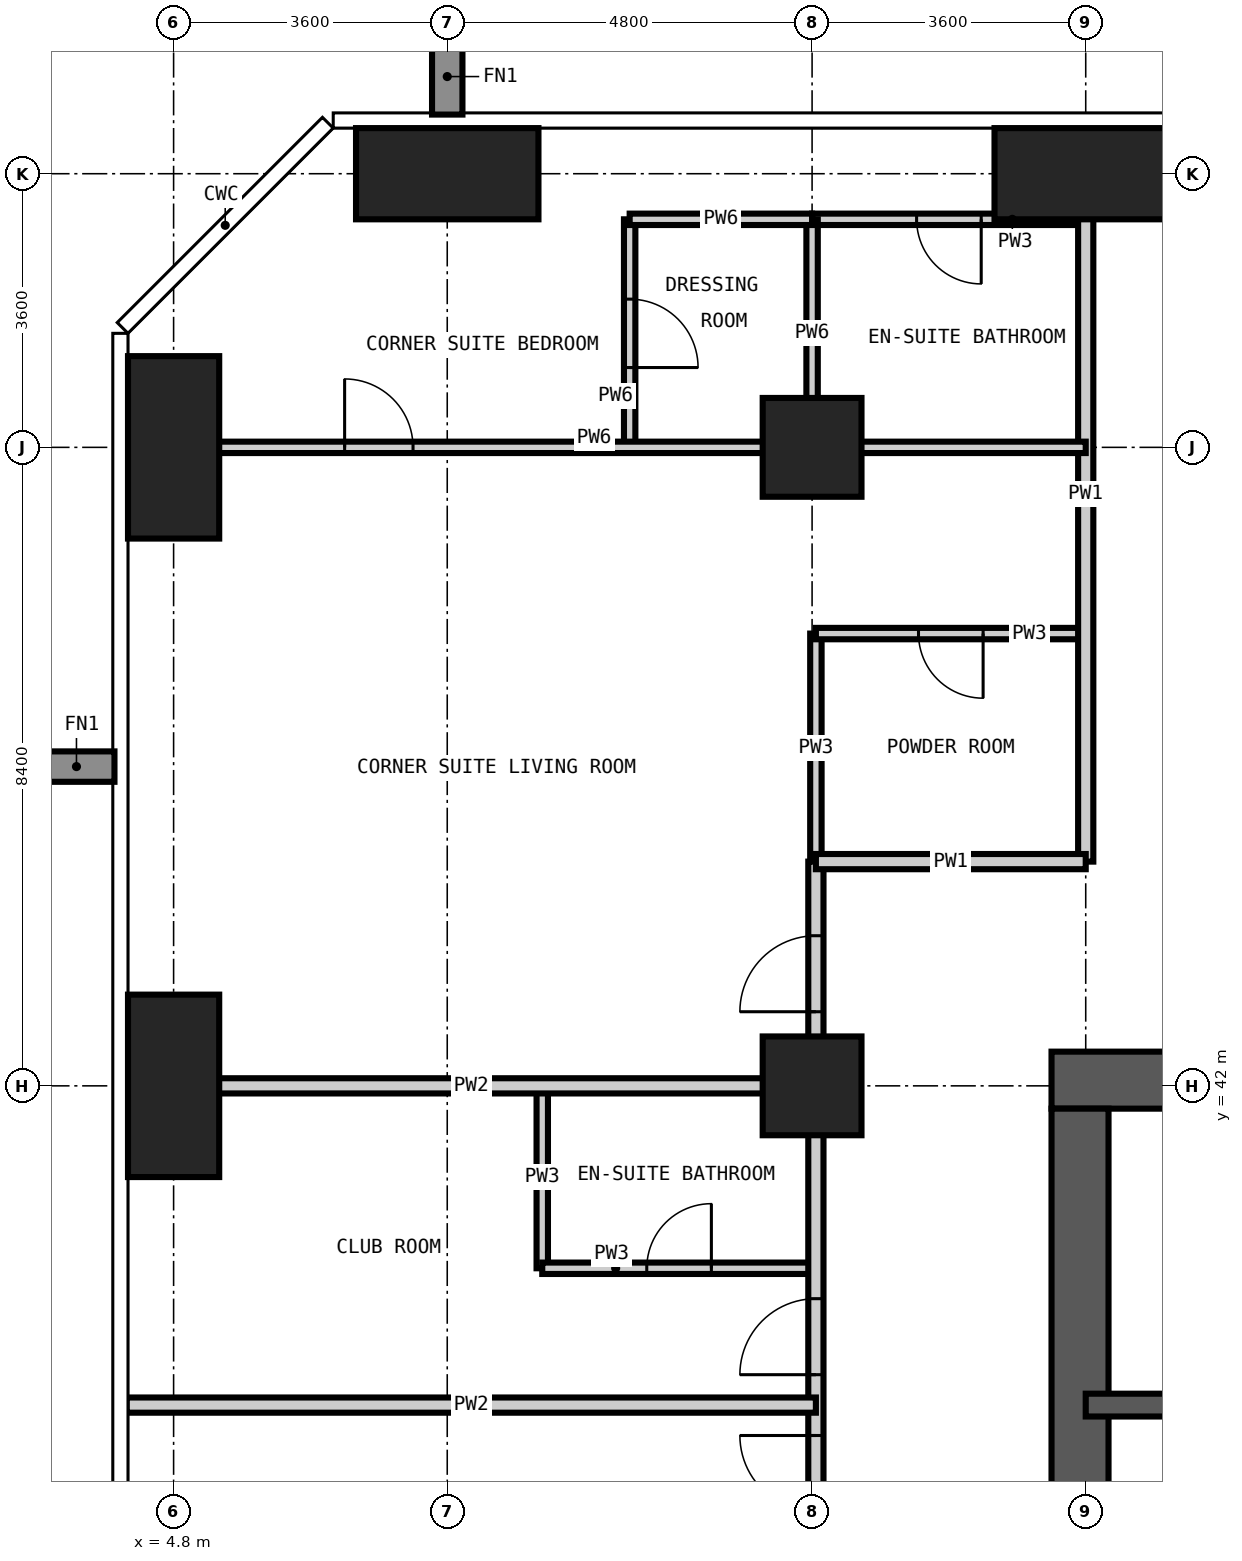
"""IFC4 building model, lengths in metres.
Left out: names, types, materials, properties, quantities, classifications, styles, units other than length and angle.
Written with IfcOpenShell. Run it as: python <this file> out.ifc"""

import sys

from ifc_helpers import new_model, si_unit, direction, frame, frame_2d, origin, origin_2d, place, context, subcontext, project, spatial, rectangle, extrude, element, fill, save


model = new_model("IFC4")
c1 = context("Model", 3, precision=1e-05, world=origin(), true_north=direction((0.0, 1.0)))
c2 = subcontext(c1, "Body", "Model", "MODEL_VIEW")
j1 = project(units=[si_unit("LENGTHUNIT", "METRE"), si_unit("PLANEANGLEUNIT", "RADIAN")], contexts=[c1])
p1 = place(None, origin())
s1 = spatial("IfcSite", under=j1, at=p1, CompositionType="ELEMENT")
p2 = place(p1, origin())
s2 = spatial("IfcBuilding", under=s1, at=p2, CompositionType="ELEMENT")
p3 = place(p2, frame((0.0, 0.0, 166.2)))
s3 = spatial("IfcBuildingStorey", under=s2, at=p3, CompositionType="ELEMENT", Elevation=166.2)
for number, where, z_axis, x_axis in (
    (1, (4.8, 42.0, -0.35), (0.0, 0.0, 1.0), (1.0, 0.0, 0.0)),
    (2, (4.8, 50.4, -0.35), (0.0, 0.0, 1.0), (1.0, 0.0, 0.0)),
):
    element("IfcColumn", number, at=place(p3, frame(where, z_axis=z_axis, x_axis=x_axis)), inside=s3, PredefinedType="COLUMN", context=c2, shape_type="SweptSolid", body=[
        extrude(rectangle(XDim=1.2, YDim=2.4, at=origin_2d()), origin(), (0.0, 0.0, 1.0), 3.6),
    ])
p4 = place(p3, frame((8.4, 54.0, -0.35), z_axis=(0.0, 0.0, 1.0), x_axis=(1.0, 0.0, 0.0)))
e3 = element("IfcColumn", 3, at=p4, inside=s3, PredefinedType="COLUMN", context=c2, shape_type="SweptSolid", body=[
    extrude(rectangle(XDim=2.4, YDim=1.2, at=origin_2d()), origin(), (0.0, 0.0, 1.0), 3.6),
])
for number, where, z_axis, x_axis in (
    (4, (13.2, 42.0, -0.35), (0.0, 0.0, 1.0), (1.0, 0.0, 0.0)),
    (5, (13.2, 50.4, -0.35), (0.0, 0.0, 1.0), (1.0, 0.0, 0.0)),
):
    element("IfcColumn", number, at=place(p3, frame(where, z_axis=z_axis, x_axis=x_axis)), inside=s3, PredefinedType="COLUMN", context=c2, shape_type="SweptSolid", body=[
        extrude(rectangle(XDim=1.3, YDim=1.3, at=origin_2d()), origin(), (0.0, 0.0, 1.0), 3.6),
    ])
p5 = place(p3, frame((16.8, 54.0, -0.35), z_axis=(0.0, 0.0, 1.0), x_axis=(1.0, 0.0, 0.0)))
e6 = element("IfcColumn", 6, at=p5, inside=s3, PredefinedType="COLUMN", context=c2, shape_type="SweptSolid", body=[
    extrude(rectangle(XDim=2.4, YDim=1.2, at=origin_2d()), origin(), (0.0, 0.0, 1.0), 3.6),
])
p6 = place(p3, frame((42.45, 42.075, -0.35), z_axis=(0.0, 0.0, 1.0), x_axis=(-1.0, 0.0, 0.0)))
e7 = element("IfcWall", 7, at=p6, inside=s3, PredefinedType="SHEAR", context=c2, shape_type="SweptSolid", body=[
    extrude(rectangle(XDim=26.1, YDim=0.75, at=frame_2d((13.05, 0.0))), origin(), (0.0, 0.0, 1.0), 3.6),
])
p7 = place(p6, frame((20.95, 0.0, 0.35)))
e8 = element("IfcOpeningElement", 8, at=p7, cuts=e7, PredefinedType="OPENING", context=c2, shape_type="SweptSolid", body=[
    extrude(rectangle(XDim=1.0, YDim=2.1, at=frame_2d((0.5, 1.05))), frame((0.0, 0.385, 0.0), z_axis=(0.0, -1.0, 0.0), x_axis=(1.0, 0.0, 0.0)), (0.0, 0.0, 1.0), 0.77),
])
p8 = place(p6, frame((10.35, 0.0, 0.35)))
e9 = element("IfcOpeningElement", 9, at=p8, cuts=e7, PredefinedType="OPENING", context=c2, shape_type="SweptSolid", body=[
    extrude(rectangle(XDim=1.2, YDim=2.2, at=frame_2d((0.6, 1.1))), frame((0.0, 0.385, 0.0), z_axis=(0.0, -1.0, 0.0), x_axis=(1.0, 0.0, 0.0)), (0.0, 0.0, 1.0), 0.77),
])
p9 = place(p3, frame((16.725, 41.7, -0.35), z_axis=(0.0, 0.0, 1.0), x_axis=(0.0, -1.0, 0.0)))
e10 = element("IfcWall", 10, at=p9, inside=s3, PredefinedType="SHEAR", context=c2, shape_type="SweptSolid", body=[
    extrude(rectangle(XDim=24.6, YDim=0.75, at=frame_2d((12.3, 0.0))), origin(), (0.0, 0.0, 1.0), 3.6),
])
p10 = place(p9, frame((11.4, 0.0, 0.35)))
e11 = element("IfcOpeningElement", 11, at=p10, cuts=e10, PredefinedType="OPENING", context=c2, shape_type="SweptSolid", body=[
    extrude(rectangle(XDim=1.8, YDim=2.2, at=frame_2d((0.9, 1.1))), frame((0.0, 0.385, 0.0), z_axis=(0.0, -1.0, 0.0), x_axis=(1.0, 0.0, 0.0)), (0.0, 0.0, 1.0), 0.77),
])
p11 = place(p9, frame((20.2, 0.0, 0.35)))
e12 = element("IfcOpeningElement", 12, at=p11, cuts=e10, PredefinedType="OPENING", context=c2, shape_type="SweptSolid", body=[
    extrude(rectangle(XDim=1.0, YDim=2.1, at=frame_2d((0.5, 1.05))), frame((0.0, 0.385, 0.0), z_axis=(0.0, -1.0, 0.0), x_axis=(1.0, 0.0, 0.0)), (0.0, 0.0, 1.0), 0.77),
])
p12 = place(p9, frame((5.5, 0.0, 0.35)))
e13 = element("IfcOpeningElement", 13, at=p12, cuts=e10, PredefinedType="OPENING", context=c2, shape_type="SweptSolid", body=[
    extrude(rectangle(XDim=1.0, YDim=2.1, at=frame_2d((0.5, 1.05))), frame((0.0, 0.385, 0.0), z_axis=(0.0, -1.0, 0.0), x_axis=(1.0, 0.0, 0.0)), (0.0, 0.0, 1.0), 0.77),
])
p13 = place(p3, frame((16.8, 37.8, -0.35), z_axis=(0.0, 0.0, 1.0), x_axis=(1.0, 0.0, 0.0)))
e14 = element("IfcWall", 14, at=p13, inside=s3, PredefinedType="SHEAR", context=c2, shape_type="SweptSolid", body=[
    extrude(rectangle(XDim=8.4, YDim=0.3, at=frame_2d((4.2, 0.0))), origin(), (0.0, 0.0, 1.0), 3.6),
])
p14 = place(p3, frame((9.65, 39.6, 0.0), z_axis=(0.0, 0.0, 1.0), x_axis=(0.0, 1.0, 0.0)))
e15 = element("IfcWall", 15, at=p14, inside=s3, PredefinedType="PARTITIONING", context=c2, shape_type="SweptSolid", body=[
    extrude(rectangle(XDim=2.4, YDim=0.15, at=frame_2d((1.2, 0.0))), origin(), (0.0, 0.0, 1.0), 3.25),
])
p15 = place(p3, frame((13.25, 44.95, 0.0), z_axis=(0.0, 0.0, 1.0), x_axis=(0.0, 1.0, 0.0)))
e16 = element("IfcWall", 16, at=p15, inside=s3, PredefinedType="PARTITIONING", context=c2, shape_type="SweptSolid", body=[
    extrude(rectangle(XDim=3.0, YDim=0.15, at=frame_2d((1.5, 0.0))), origin(), (0.0, 0.0, 1.0), 3.25),
])
p16 = place(p3, frame((9.65, 39.6, 0.0), z_axis=(0.0, 0.0, 1.0), x_axis=(1.0, 0.0, 0.0)))
e17 = element("IfcWall", 17, at=p16, inside=s3, PredefinedType="PARTITIONING", context=c2, shape_type="SweptSolid", body=[
    extrude(rectangle(XDim=3.6, YDim=0.15, at=frame_2d((1.8, 0.0))), origin(), (0.0, 0.0, 1.0), 3.25),
])
p17 = place(p16, frame((1.375, 0.0, 0.0)))
e18 = element("IfcOpeningElement", 18, at=p17, cuts=e17, PredefinedType="OPENING", context=c2, shape_type="SweptSolid", body=[
    extrude(rectangle(XDim=0.85, YDim=2.1, at=frame_2d((0.425, 1.05))), frame((0.0, 0.085, 0.0), z_axis=(0.0, -1.0, 0.0), x_axis=(1.0, 0.0, 0.0)), (0.0, 0.0, 1.0), 0.17),
])
p18 = place(p3, frame((13.25, 47.95, 0.0), z_axis=(0.0, 0.0, 1.0), x_axis=(1.0, 0.0, 0.0)))
e19 = element("IfcWall", 19, at=p18, inside=s3, PredefinedType="PARTITIONING", context=c2, shape_type="SweptSolid", body=[
    extrude(rectangle(XDim=3.55, YDim=0.15, at=frame_2d((1.775, 0.0))), origin(), (0.0, 0.0, 1.0), 3.25),
])
p19 = place(p18, frame((1.35, 0.0, 0.0)))
e20 = element("IfcOpeningElement", 20, at=p19, cuts=e19, PredefinedType="OPENING", context=c2, shape_type="SweptSolid", body=[
    extrude(rectangle(XDim=0.85, YDim=2.1, at=frame_2d((0.425, 1.05))), frame((0.0, 0.085, 0.0), z_axis=(0.0, -1.0, 0.0), x_axis=(1.0, 0.0, 0.0)), (0.0, 0.0, 1.0), 0.17),
])
p20 = place(p3, frame((13.2, 53.4, 0.0), z_axis=(0.0, 0.0, 1.0), x_axis=(1.0, 0.0, 0.0)))
e21 = element("IfcWall", 21, at=p20, inside=s3, PredefinedType="PARTITIONING", context=c2, shape_type="SweptSolid", body=[
    extrude(rectangle(XDim=3.6, YDim=0.15, at=frame_2d((1.8, 0.0))), origin(), (0.0, 0.0, 1.0), 3.25),
])
p21 = place(p20, frame((1.375, 0.0, 0.0)))
e22 = element("IfcOpeningElement", 22, at=p21, cuts=e21, PredefinedType="OPENING", context=c2, shape_type="SweptSolid", body=[
    extrude(rectangle(XDim=0.85, YDim=2.1, at=frame_2d((0.425, 1.05))), frame((0.0, 0.085, 0.0), z_axis=(0.0, -1.0, 0.0), x_axis=(1.0, 0.0, 0.0)), (0.0, 0.0, 1.0), 0.17),
])
p22 = place(p3, frame((13.25, 13.25, 0.0), z_axis=(0.0, 0.0, 1.0), x_axis=(0.0, 1.0, 0.0)))
e23 = element("IfcWall", 23, at=p22, inside=s3, PredefinedType="PARTITIONING", context=c2, shape_type="SweptSolid", body=[
    extrude(rectangle(XDim=31.7, YDim=0.2, at=frame_2d((15.85, 0.0))), origin(), (0.0, 0.0, 1.0), 3.25),
])
p23 = place(p22, frame((6.35, 0.0, 0.0)))
e24 = element("IfcOpeningElement", 24, at=p23, cuts=e23, PredefinedType="OPENING", context=c2, shape_type="SweptSolid", body=[
    extrude(rectangle(XDim=1.0, YDim=2.2, at=frame_2d((0.5, 1.1))), frame((0.0, 0.11, 0.0), z_axis=(0.0, -1.0, 0.0), x_axis=(1.0, 0.0, 0.0)), (0.0, 0.0, 1.0), 0.22),
])
p24 = place(p22, frame((8.15, 0.0, 0.0)))
e25 = element("IfcOpeningElement", 25, at=p24, cuts=e23, PredefinedType="OPENING", context=c2, shape_type="SweptSolid", body=[
    extrude(rectangle(XDim=1.0, YDim=2.2, at=frame_2d((0.5, 1.1))), frame((0.0, 0.11, 0.0), z_axis=(0.0, -1.0, 0.0), x_axis=(1.0, 0.0, 0.0)), (0.0, 0.0, 1.0), 0.22),
])
p25 = place(p22, frame((14.75, 0.0, 0.0)))
e26 = element("IfcOpeningElement", 26, at=p25, cuts=e23, PredefinedType="OPENING", context=c2, shape_type="SweptSolid", body=[
    extrude(rectangle(XDim=1.0, YDim=2.2, at=frame_2d((0.5, 1.1))), frame((0.0, 0.11, 0.0), z_axis=(0.0, -1.0, 0.0), x_axis=(1.0, 0.0, 0.0)), (0.0, 0.0, 1.0), 0.22),
])
p26 = place(p22, frame((16.55, 0.0, 0.0)))
e27 = element("IfcOpeningElement", 27, at=p26, cuts=e23, PredefinedType="OPENING", context=c2, shape_type="SweptSolid", body=[
    extrude(rectangle(XDim=1.0, YDim=2.2, at=frame_2d((0.5, 1.1))), frame((0.0, 0.11, 0.0), z_axis=(0.0, -1.0, 0.0), x_axis=(1.0, 0.0, 0.0)), (0.0, 0.0, 1.0), 0.22),
])
p27 = place(p22, frame((23.15, 0.0, 0.0)))
e28 = element("IfcOpeningElement", 28, at=p27, cuts=e23, PredefinedType="OPENING", context=c2, shape_type="SweptSolid", body=[
    extrude(rectangle(XDim=1.0, YDim=2.2, at=frame_2d((0.5, 1.1))), frame((0.0, 0.11, 0.0), z_axis=(0.0, -1.0, 0.0), x_axis=(1.0, 0.0, 0.0)), (0.0, 0.0, 1.0), 0.22),
])
p28 = place(p22, frame((24.95, 0.0, 0.0)))
e29 = element("IfcOpeningElement", 29, at=p28, cuts=e23, PredefinedType="OPENING", context=c2, shape_type="SweptSolid", body=[
    extrude(rectangle(XDim=1.0, YDim=2.2, at=frame_2d((0.5, 1.1))), frame((0.0, 0.11, 0.0), z_axis=(0.0, -1.0, 0.0), x_axis=(1.0, 0.0, 0.0)), (0.0, 0.0, 1.0), 0.22),
])
p29 = place(p22, frame((1.275, 0.0, 0.0)))
e30 = element("IfcOpeningElement", 30, at=p29, cuts=e23, PredefinedType="OPENING", context=c2, shape_type="SweptSolid", body=[
    extrude(rectangle(XDim=1.0, YDim=2.2, at=frame_2d((0.5, 1.1))), frame((0.0, 0.11, 0.0), z_axis=(0.0, -1.0, 0.0), x_axis=(1.0, 0.0, 0.0)), (0.0, 0.0, 1.0), 0.22),
])
p30 = place(p22, frame((29.725, 0.0, 0.0)))
e31 = element("IfcOpeningElement", 31, at=p30, cuts=e23, PredefinedType="OPENING", context=c2, shape_type="SweptSolid", body=[
    extrude(rectangle(XDim=1.0, YDim=2.2, at=frame_2d((0.5, 1.1))), frame((0.0, 0.11, 0.0), z_axis=(0.0, -1.0, 0.0), x_axis=(1.0, 0.0, 0.0)), (0.0, 0.0, 1.0), 0.22),
])
p31 = place(p3, frame((16.8, 44.95, 0.0), z_axis=(0.0, 0.0, 1.0), x_axis=(0.0, 1.0, 0.0)))
e32 = element("IfcWall", 32, at=p31, inside=s3, PredefinedType="PARTITIONING", context=c2, shape_type="SweptSolid", body=[
    extrude(rectangle(XDim=9.668, YDim=0.2, at=frame_2d((4.834, 0.0))), origin(), (0.0, 0.0, 1.0), 3.25),
])
p32 = place(p3, frame((13.25, 44.95, 0.0), z_axis=(0.0, 0.0, 1.0), x_axis=(1.0, 0.0, 0.0)))
e33 = element("IfcWall", 33, at=p32, inside=s3, PredefinedType="PARTITIONING", context=c2, shape_type="SweptSolid", body=[
    extrude(rectangle(XDim=3.55, YDim=0.2, at=frame_2d((1.775, 0.0))), origin(), (0.0, 0.0, 1.0), 3.25),
])
for number, where, z_axis, x_axis in (
    (34, (4.182, 37.8, 0.0), (0.0, 0.0, 1.0), (1.0, 0.0, 0.0)),
    (35, (4.182, 42.0, 0.0), (0.0, 0.0, 1.0), (1.0, 0.0, 0.0)),
):
    element("IfcWall", number, at=place(p3, frame(where, z_axis=z_axis, x_axis=x_axis)), inside=s3, PredefinedType="PARTITIONING", context=c2, shape_type="SweptSolid", body=[
        extrude(rectangle(XDim=9.068, YDim=0.2, at=frame_2d((4.534, 0.0))), origin(), (0.0, 0.0, 1.0), 3.25),
    ])
p33 = place(p3, frame((10.8, 50.4, 0.0), z_axis=(0.0, 0.0, 1.0), x_axis=(0.0, 1.0, 0.0)))
e36 = element("IfcWall", 36, at=p33, inside=s3, PredefinedType="PARTITIONING", context=c2, shape_type="SweptSolid", body=[
    extrude(rectangle(XDim=3.0, YDim=0.15, at=frame_2d((1.5, 0.0))), origin(), (0.0, 0.0, 1.0), 3.25),
])
p34 = place(p33, frame((1.05, 0.0, 0.0)))
e37 = element("IfcOpeningElement", 37, at=p34, cuts=e36, PredefinedType="OPENING", context=c2, shape_type="SweptSolid", body=[
    extrude(rectangle(XDim=0.9, YDim=2.1, at=frame_2d((0.45, 1.05))), frame((0.0, 0.085, 0.0), z_axis=(0.0, -1.0, 0.0), x_axis=(1.0, 0.0, 0.0)), (0.0, 0.0, 1.0), 0.17),
])
p35 = place(p3, frame((13.2, 50.4, 0.0), z_axis=(0.0, 0.0, 1.0), x_axis=(0.0, 1.0, 0.0)))
e38 = element("IfcWall", 38, at=p35, inside=s3, PredefinedType="PARTITIONING", context=c2, shape_type="SweptSolid", body=[
    extrude(rectangle(XDim=3.0, YDim=0.15, at=frame_2d((1.5, 0.0))), origin(), (0.0, 0.0, 1.0), 3.25),
])
p36 = place(p3, frame((4.182, 50.4, 0.0), z_axis=(0.0, 0.0, 1.0), x_axis=(1.0, 0.0, 0.0)))
e39 = element("IfcWall", 39, at=p36, inside=s3, PredefinedType="PARTITIONING", context=c2, shape_type="SweptSolid", body=[
    extrude(rectangle(XDim=12.618, YDim=0.15, at=frame_2d((6.309, 0.0))), origin(), (0.0, 0.0, 1.0), 3.25),
])
p37 = place(p36, frame((2.868, 0.0, 0.0)))
e40 = element("IfcOpeningElement", 40, at=p37, cuts=e39, PredefinedType="OPENING", context=c2, shape_type="SweptSolid", body=[
    extrude(rectangle(XDim=0.9, YDim=2.1, at=frame_2d((0.45, 1.05))), frame((0.0, 0.085, 0.0), z_axis=(0.0, -1.0, 0.0), x_axis=(1.0, 0.0, 0.0)), (0.0, 0.0, 1.0), 0.17),
])
p38 = place(p3, frame((10.8, 53.4, 0.0), z_axis=(0.0, 0.0, 1.0), x_axis=(1.0, 0.0, 0.0)))
e41 = element("IfcWall", 41, at=p38, inside=s3, PredefinedType="PARTITIONING", context=c2, shape_type="SweptSolid", body=[
    extrude(rectangle(XDim=2.4, YDim=0.15, at=frame_2d((1.2, 0.0))), origin(), (0.0, 0.0, 1.0), 3.25),
])
p39 = place(p27, origin())
e42 = element("IfcDoor", 42, at=p39, inside=s3, OperationType="SINGLE_SWING_RIGHT", PredefinedType="DOOR", context=c2, shape_type="SweptSolid", body=[
    extrude(rectangle(XDim=1.0, YDim=2.2, at=frame_2d((0.5, 1.1))), frame((0.0, 0.025, 0.0), z_axis=(0.0, -1.0, 0.0), x_axis=(1.0, 0.0, 0.0)), (0.0, 0.0, 1.0), 0.05),
])
fill(e28, e42)
p40 = place(p28, origin())
e43 = element("IfcDoor", 43, at=p40, inside=s3, OperationType="SINGLE_SWING_LEFT", PredefinedType="DOOR", context=c2, shape_type="SweptSolid", body=[
    extrude(rectangle(XDim=1.0, YDim=2.2, at=frame_2d((0.5, 1.1))), frame((0.0, 0.025, 0.0), z_axis=(0.0, -1.0, 0.0), x_axis=(1.0, 0.0, 0.0)), (0.0, 0.0, 1.0), 0.05),
])
fill(e29, e43)
p41 = place(p17, origin())
e44 = element("IfcDoor", 44, at=p41, inside=s3, OperationType="SINGLE_SWING_RIGHT", PredefinedType="DOOR", context=c2, shape_type="SweptSolid", body=[
    extrude(rectangle(XDim=0.85, YDim=2.1, at=frame_2d((0.425, 1.05))), frame((0.0, 0.025, 0.0), z_axis=(0.0, -1.0, 0.0), x_axis=(1.0, 0.0, 0.0)), (0.0, 0.0, 1.0), 0.05),
])
fill(e18, e44)
p42 = place(p30, origin())
e45 = element("IfcDoor", 45, at=p42, inside=s3, OperationType="SINGLE_SWING_LEFT", PredefinedType="DOOR", context=c2, shape_type="SweptSolid", body=[
    extrude(rectangle(XDim=1.0, YDim=2.2, at=frame_2d((0.5, 1.1))), frame((0.0, 0.025, 0.0), z_axis=(0.0, -1.0, 0.0), x_axis=(1.0, 0.0, 0.0)), (0.0, 0.0, 1.0), 0.05),
])
fill(e31, e45)
p43 = place(p19, frame((0.85, 0.0, 0.0), z_axis=(0.0, 0.0, 1.0), x_axis=(-1.0, 0.0, 0.0)))
e46 = element("IfcDoor", 46, at=p43, inside=s3, OperationType="SINGLE_SWING_LEFT", PredefinedType="DOOR", context=c2, shape_type="SweptSolid", body=[
    extrude(rectangle(XDim=0.85, YDim=2.1, at=frame_2d((0.425, 1.05))), frame((0.0, 0.025, 0.0), z_axis=(0.0, -1.0, 0.0), x_axis=(1.0, 0.0, 0.0)), (0.0, 0.0, 1.0), 0.05),
])
fill(e20, e46)
p44 = place(p37, origin())
e47 = element("IfcDoor", 47, at=p44, inside=s3, OperationType="SINGLE_SWING_LEFT", PredefinedType="DOOR", context=c2, shape_type="SweptSolid", body=[
    extrude(rectangle(XDim=0.9, YDim=2.1, at=frame_2d((0.45, 1.05))), frame((0.0, 0.025, 0.0), z_axis=(0.0, -1.0, 0.0), x_axis=(1.0, 0.0, 0.0)), (0.0, 0.0, 1.0), 0.05),
])
fill(e40, e47)
p45 = place(p21, frame((0.85, 0.0, 0.0), z_axis=(0.0, 0.0, 1.0), x_axis=(-1.0, 0.0, 0.0)))
e48 = element("IfcDoor", 48, at=p45, inside=s3, OperationType="SINGLE_SWING_LEFT", PredefinedType="DOOR", context=c2, shape_type="SweptSolid", body=[
    extrude(rectangle(XDim=0.85, YDim=2.1, at=frame_2d((0.425, 1.05))), frame((0.0, 0.025, 0.0), z_axis=(0.0, -1.0, 0.0), x_axis=(1.0, 0.0, 0.0)), (0.0, 0.0, 1.0), 0.05),
])
fill(e22, e48)
p46 = place(p34, frame((0.9, 0.0, 0.0), z_axis=(0.0, 0.0, 1.0), x_axis=(-1.0, 0.0, 0.0)))
e49 = element("IfcDoor", 49, at=p46, inside=s3, OperationType="SINGLE_SWING_RIGHT", PredefinedType="DOOR", context=c2, shape_type="SweptSolid", body=[
    extrude(rectangle(XDim=0.9, YDim=2.1, at=frame_2d((0.45, 1.05))), frame((0.0, 0.025, 0.0), z_axis=(0.0, -1.0, 0.0), x_axis=(1.0, 0.0, 0.0)), (0.0, 0.0, 1.0), 0.05),
])
fill(e37, e49)
save(model, sys.argv[1])
